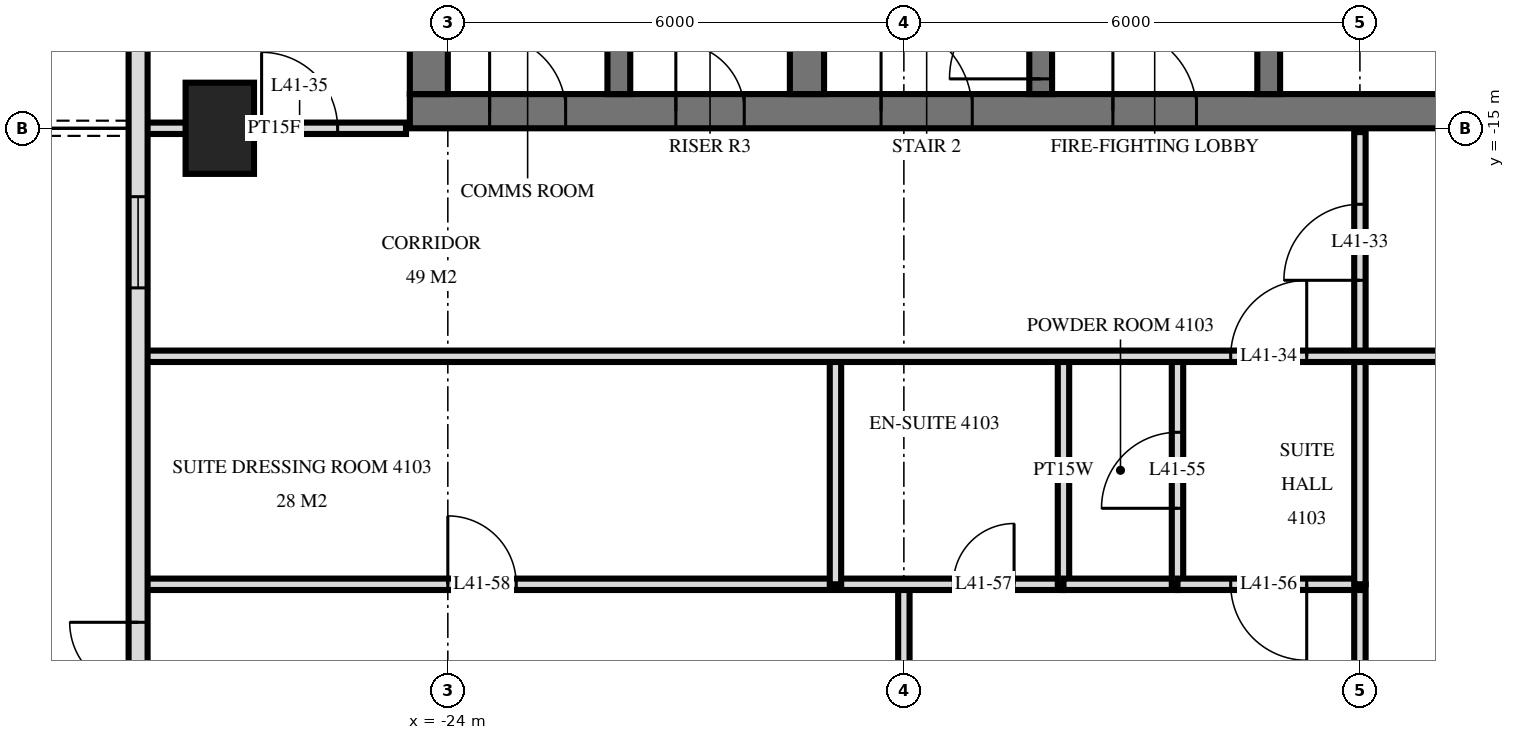
"""IFC4 building model, lengths in metres.
Left out: names, types, materials, properties, quantities, classifications, styles, units other than length and angle.
Written with IfcOpenShell. Run it as: python <this file> out.ifc"""

import sys

from ifc_helpers import new_model, si_unit, direction, frame, frame_2d, origin, origin_2d, place, context, subcontext, project, spatial, rectangle, extrude, element, fill, save


model = new_model("IFC4")
c1 = context("Model", 3, precision=1e-05, world=origin(), true_north=direction((0.0, 1.0)))
c2 = subcontext(c1, "Body", "Model", "MODEL_VIEW")
j1 = project(units=[si_unit("LENGTHUNIT", "METRE"), si_unit("PLANEANGLEUNIT", "RADIAN")], contexts=[c1])
p1 = place(None, origin())
s1 = spatial("IfcSite", under=j1, at=p1, CompositionType="ELEMENT")
p2 = place(p1, origin())
s2 = spatial("IfcBuilding", under=s1, at=p2, CompositionType="ELEMENT")
p3 = place(p2, frame((0.0, 0.0, 159.6)))
s3 = spatial("IfcBuildingStorey", under=s2, at=p3, CompositionType="ELEMENT", Elevation=159.6)
p4 = place(p3, frame((-27.0, -15.0, 0.0), z_axis=(0.0, 0.0, 1.0), x_axis=(0.0, 1.0, 0.0)))
e1 = element("IfcColumn", 1, at=p4, inside=s3, PredefinedType="COLUMN", context=c2, shape_type="SweptSolid", body=[
    extrude(rectangle(XDim=1.2, YDim=0.9, at=origin_2d()), origin(), (0.0, 0.0, 1.0), 3.6),
])
p5 = place(p3, frame((-24.5, -14.775, 0.0), z_axis=(0.0, 0.0, 1.0), x_axis=(1.0, 0.0, 0.0)))
e2 = element("IfcWall", 2, at=p5, inside=s3, PredefinedType="SHEAR", context=c2, shape_type="SweptSolid", body=[
    extrude(rectangle(XDim=14.5, YDim=0.45, at=frame_2d((7.25, 0.0))), origin(), (0.0, 0.0, 1.0), 3.6),
])
p6 = place(p5, frame((6.2, 0.0, 0.0)))
e3 = element("IfcOpeningElement", 3, at=p6, cuts=e2, PredefinedType="OPENING", context=c2, shape_type="SweptSolid", body=[
    extrude(rectangle(XDim=1.2, YDim=2.1, at=frame_2d((0.6, 1.05))), frame((0.0, 0.235, 0.0), z_axis=(0.0, -1.0, 0.0), x_axis=(1.0, 0.0, 0.0)), (0.0, 0.0, 1.0), 0.47),
])
p7 = place(p5, frame((9.25, 0.0, 0.0)))
e4 = element("IfcOpeningElement", 4, at=p7, cuts=e2, PredefinedType="OPENING", context=c2, shape_type="SweptSolid", body=[
    extrude(rectangle(XDim=1.1, YDim=2.1, at=frame_2d((0.55, 1.05))), frame((0.0, 0.235, 0.0), z_axis=(0.0, -1.0, 0.0), x_axis=(1.0, 0.0, 0.0)), (0.0, 0.0, 1.0), 0.47),
])
p8 = place(p5, frame((3.5, 0.0, 0.0)))
e5 = element("IfcOpeningElement", 5, at=p8, cuts=e2, PredefinedType="OPENING", context=c2, shape_type="SweptSolid", body=[
    extrude(rectangle(XDim=0.9, YDim=2.1, at=frame_2d((0.45, 1.05))), frame((0.0, 0.235, 0.0), z_axis=(0.0, -1.0, 0.0), x_axis=(1.0, 0.0, 0.0)), (0.0, 0.0, 1.0), 0.47),
])
p9 = place(p5, frame((1.05, 0.0, 0.0)))
e6 = element("IfcOpeningElement", 6, at=p9, cuts=e2, PredefinedType="OPENING", context=c2, shape_type="SweptSolid", body=[
    extrude(rectangle(XDim=1.0, YDim=2.1, at=frame_2d((0.5, 1.05))), frame((0.0, 0.235, 0.0), z_axis=(0.0, -1.0, 0.0), x_axis=(1.0, 0.0, 0.0)), (0.0, 0.0, 1.0), 0.47),
])
p10 = place(p3, frame((-24.25, -14.55, 0.0), z_axis=(0.0, 0.0, 1.0), x_axis=(0.0, 1.0, 0.0)))
e7 = element("IfcWall", 7, at=p10, inside=s3, PredefinedType="SHEAR", context=c2, shape_type="SweptSolid", body=[
    extrude(rectangle(XDim=14.1, YDim=0.5, at=frame_2d((7.05, 0.0))), origin(), (0.0, 0.0, 1.0), 3.6),
])
p11 = place(p3, frame((-13.2, -14.55, 0.0), z_axis=(0.0, 0.0, 1.0), x_axis=(0.0, 1.0, 0.0)))
e8 = element("IfcWall", 8, at=p11, inside=s3, PredefinedType="SHEAR", context=c2, shape_type="SweptSolid", body=[
    extrude(rectangle(XDim=5.4, YDim=0.3, at=frame_2d((2.7, 0.0))), origin(), (0.0, 0.0, 1.0), 3.6),
])
p12 = place(p11, frame((4.0, 0.0, 0.0)))
e9 = element("IfcOpeningElement", 9, at=p12, cuts=e8, PredefinedType="OPENING", context=c2, shape_type="SweptSolid", body=[
    extrude(rectangle(XDim=1.2, YDim=2.1, at=frame_2d((0.6, 1.05))), frame((0.0, 0.16, 0.0), z_axis=(0.0, -1.0, 0.0), x_axis=(1.0, 0.0, 0.0)), (0.0, 0.0, 1.0), 0.32),
])
p13 = place(p3, frame((-16.2, -14.55, 0.0), z_axis=(0.0, 0.0, 1.0), x_axis=(0.0, 1.0, 0.0)))
e10 = element("IfcWall", 10, at=p13, inside=s3, PredefinedType="SHEAR", context=c2, shape_type="SweptSolid", body=[
    extrude(rectangle(XDim=5.4, YDim=0.3, at=frame_2d((2.7, 0.0))), origin(), (0.0, 0.0, 1.0), 3.6),
])
p14 = place(p13, frame((0.2, 0.0, 0.0)))
e11 = element("IfcOpeningElement", 11, at=p14, cuts=e10, PredefinedType="OPENING", context=c2, shape_type="SweptSolid", body=[
    extrude(rectangle(XDim=1.2, YDim=2.1, at=frame_2d((0.6, 1.05))), frame((0.0, 0.16, 0.0), z_axis=(0.0, -1.0, 0.0), x_axis=(1.0, 0.0, 0.0)), (0.0, 0.0, 1.0), 0.32),
])
p15 = place(p3, frame((-19.275, -14.55, 0.0), z_axis=(0.0, 0.0, 1.0), x_axis=(0.0, 1.0, 0.0)))
e12 = element("IfcWall", 12, at=p15, inside=s3, PredefinedType="SHEAR", context=c2, shape_type="SweptSolid", body=[
    extrude(rectangle(XDim=5.4, YDim=0.45, at=frame_2d((2.7, 0.0))), origin(), (0.0, 0.0, 1.0), 3.6),
])
p16 = place(p3, frame((-21.75, -14.55, 0.0), z_axis=(0.0, 0.0, 1.0), x_axis=(0.0, 1.0, 0.0)))
e13 = element("IfcWall", 13, at=p16, inside=s3, PredefinedType="SHEAR", context=c2, shape_type="SweptSolid", body=[
    extrude(rectangle(XDim=5.4, YDim=0.3, at=frame_2d((2.7, 0.0))), origin(), (0.0, 0.0, 1.0), 3.6),
])
p17 = place(p3, frame((-28.075, -3.325, 0.0), z_axis=(0.0, 0.0, 1.0), x_axis=(0.0, -1.0, 0.0)))
e14 = element("IfcWall", 14, at=p17, inside=s3, PredefinedType="SOLIDWALL", context=c2, shape_type="SweptSolid", body=[
    extrude(rectangle(XDim=25.951, YDim=0.25, at=frame_2d((12.975, 0.0))), origin(), (0.0, 0.0, 1.0), 3.32),
])
p18 = place(p17, frame((6.65, 0.0, 0.0)))
e15 = element("IfcOpeningElement", 15, at=p18, cuts=e14, PredefinedType="OPENING", context=c2, shape_type="SweptSolid", body=[
    extrude(rectangle(XDim=1.8, YDim=2.4, at=frame_2d((0.9, 1.2))), frame((0.0, 0.135, 0.0), z_axis=(0.0, -1.0, 0.0), x_axis=(1.0, 0.0, 0.0)), (0.0, 0.0, 1.0), 0.27),
])
p19 = place(p17, frame((12.575, 0.0, 0.3)))
e16 = element("IfcOpeningElement", 16, at=p19, cuts=e14, PredefinedType="OPENING", context=c2, shape_type="SweptSolid", body=[
    extrude(rectangle(XDim=1.2, YDim=2.1, at=frame_2d((0.6, 1.05))), frame((0.0, 0.135, 0.0), z_axis=(0.0, -1.0, 0.0), x_axis=(1.0, 0.0, 0.0)), (0.0, 0.0, 1.0), 0.27),
])
p20 = place(p17, frame((18.175, 0.0, 0.0)))
e17 = element("IfcOpeningElement", 17, at=p20, cuts=e14, PredefinedType="OPENING", context=c2, shape_type="SweptSolid", body=[
    extrude(rectangle(XDim=1.8, YDim=2.4, at=frame_2d((0.9, 1.2))), frame((0.0, 0.135, 0.0), z_axis=(0.0, -1.0, 0.0), x_axis=(1.0, 0.0, 0.0)), (0.0, 0.0, 1.0), 0.27),
])
p21 = place(p17, frame((21.075, 0.0, 0.0)))
e18 = element("IfcOpeningElement", 18, at=p21, cuts=e14, PredefinedType="OPENING", context=c2, shape_type="SweptSolid", body=[
    extrude(rectangle(XDim=1.8, YDim=2.4, at=frame_2d((0.9, 1.2))), frame((0.0, 0.135, 0.0), z_axis=(0.0, -1.0, 0.0), x_axis=(1.0, 0.0, 0.0)), (0.0, 0.0, 1.0), 0.27),
])
p22 = place(p17, frame((23.825, 0.0, 0.3)))
e19 = element("IfcOpeningElement", 19, at=p22, cuts=e14, PredefinedType="OPENING", context=c2, shape_type="SweptSolid", body=[
    extrude(rectangle(XDim=1.8, YDim=2.1, at=frame_2d((0.9, 1.05))), frame((0.0, 0.135, 0.0), z_axis=(0.0, -1.0, 0.0), x_axis=(1.0, 0.0, 0.0)), (0.0, 0.0, 1.0), 0.27),
])
p23 = place(p3, frame((-12.0, -21.0, 0.0), z_axis=(0.0, 0.0, 1.0), x_axis=(0.0, 1.0, 0.0)))
e20 = element("IfcWall", 20, at=p23, inside=s3, PredefinedType="PARTITIONING", context=c2, shape_type="SweptSolid", body=[
    extrude(rectangle(XDim=5.95, YDim=0.15, at=frame_2d((2.975, 0.0))), origin(), (0.0, 0.0, 1.0), 3.32),
])
p24 = place(p23, frame((4.0, 0.0, 0.0)))
e21 = element("IfcOpeningElement", 21, at=p24, cuts=e20, PredefinedType="OPENING", context=c2, shape_type="SweptSolid", body=[
    extrude(rectangle(XDim=1.0, YDim=2.1, at=frame_2d((0.5, 1.05))), frame((0.0, 0.085, 0.0), z_axis=(0.0, -1.0, 0.0), x_axis=(1.0, 0.0, 0.0)), (0.0, 0.0, 1.0), 0.17),
])
p25 = place(p3, frame((-12.0, -33.62, 0.0), z_axis=(0.0, 0.0, 1.0), x_axis=(0.0, 1.0, 0.0)))
e22 = element("IfcWall", 22, at=p25, inside=s3, PredefinedType="PARTITIONING", context=c2, shape_type="SweptSolid", body=[
    extrude(rectangle(XDim=12.62, YDim=0.15, at=frame_2d((6.31, 0.0))), origin(), (0.0, 0.0, 1.0), 3.32),
])
p26 = place(p3, frame((-14.4, -21.0, 0.0), z_axis=(0.0, 0.0, 1.0), x_axis=(0.0, 1.0, 0.0)))
e23 = element("IfcWall", 23, at=p26, inside=s3, PredefinedType="PARTITIONING", context=c2, shape_type="SweptSolid", body=[
    extrude(rectangle(XDim=3.0, YDim=0.15, at=frame_2d((1.5, 0.0))), origin(), (0.0, 0.0, 1.0), 3.32),
])
p27 = place(p26, frame((1.0, 0.0, 0.0)))
e24 = element("IfcOpeningElement", 24, at=p27, cuts=e23, PredefinedType="OPENING", context=c2, shape_type="SweptSolid", body=[
    extrude(rectangle(XDim=1.0, YDim=2.1, at=frame_2d((0.5, 1.05))), frame((0.0, 0.085, 0.0), z_axis=(0.0, -1.0, 0.0), x_axis=(1.0, 0.0, 0.0)), (0.0, 0.0, 1.0), 0.17),
])
p28 = place(p3, frame((-15.9, -21.0, 0.0), z_axis=(0.0, 0.0, 1.0), x_axis=(0.0, 1.0, 0.0)))
e25 = element("IfcWall", 25, at=p28, inside=s3, PredefinedType="PLUMBINGWALL", context=c2, shape_type="SweptSolid", body=[
    extrude(rectangle(XDim=3.0, YDim=0.15, at=frame_2d((1.5, 0.0))), origin(), (0.0, 0.0, 1.0), 3.32),
])
p29 = place(p3, frame((-18.0, -33.62, 0.0), z_axis=(0.0, 0.0, 1.0), x_axis=(0.0, 1.0, 0.0)))
e26 = element("IfcWall", 26, at=p29, inside=s3, PredefinedType="PARTITIONING", context=c2, shape_type="SweptSolid", body=[
    extrude(rectangle(XDim=12.62, YDim=0.15, at=frame_2d((6.31, 0.0))), origin(), (0.0, 0.0, 1.0), 3.32),
])
p30 = place(p29, frame((5.79, 0.0, 0.0)))
e27 = element("IfcOpeningElement", 27, at=p30, cuts=e26, PredefinedType="OPENING", context=c2, shape_type="SweptSolid", body=[
    extrude(rectangle(XDim=0.9, YDim=2.1, at=frame_2d((0.45, 1.05))), frame((0.0, 0.085, 0.0), z_axis=(0.0, -1.0, 0.0), x_axis=(1.0, 0.0, 0.0)), (0.0, 0.0, 1.0), 0.17),
])
p31 = place(p3, frame((-18.9, -21.0, 0.0), z_axis=(0.0, 0.0, 1.0), x_axis=(0.0, 1.0, 0.0)))
e28 = element("IfcWall", 28, at=p31, inside=s3, PredefinedType="PARTITIONING", context=c2, shape_type="SweptSolid", body=[
    extrude(rectangle(XDim=3.0, YDim=0.15, at=frame_2d((1.5, 0.0))), origin(), (0.0, 0.0, 1.0), 3.32),
])
p32 = place(p3, frame((-14.4, -21.0, 0.0), z_axis=(0.0, 0.0, 1.0), x_axis=(1.0, 0.0, 0.0)))
e29 = element("IfcWall", 29, at=p32, inside=s3, PredefinedType="PARTITIONING", context=c2, shape_type="SweptSolid", body=[
    extrude(rectangle(XDim=2.4, YDim=0.15, at=frame_2d((1.2, 0.0))), origin(), (0.0, 0.0, 1.0), 3.32),
])
p33 = place(p32, frame((0.7, 0.0, 0.0)))
e30 = element("IfcOpeningElement", 30, at=p33, cuts=e29, PredefinedType="OPENING", context=c2, shape_type="SweptSolid", body=[
    extrude(rectangle(XDim=1.0, YDim=2.1, at=frame_2d((0.5, 1.05))), frame((0.0, 0.085, 0.0), z_axis=(0.0, -1.0, 0.0), x_axis=(1.0, 0.0, 0.0)), (0.0, 0.0, 1.0), 0.17),
])
p34 = place(p3, frame((-28.02, -21.0, 0.0), z_axis=(0.0, 0.0, 1.0), x_axis=(1.0, 0.0, 0.0)))
e31 = element("IfcWall", 31, at=p34, inside=s3, PredefinedType="PARTITIONING", context=c2, shape_type="SweptSolid", body=[
    extrude(rectangle(XDim=12.12, YDim=0.15, at=frame_2d((6.06, 0.0))), origin(), (0.0, 0.0, 1.0), 3.32),
])
p35 = place(p34, frame((10.67, 0.0, 0.0)))
e32 = element("IfcOpeningElement", 32, at=p35, cuts=e31, PredefinedType="OPENING", context=c2, shape_type="SweptSolid", body=[
    extrude(rectangle(XDim=0.8, YDim=2.1, at=frame_2d((0.4, 1.05))), frame((0.0, 0.085, 0.0), z_axis=(0.0, -1.0, 0.0), x_axis=(1.0, 0.0, 0.0)), (0.0, 0.0, 1.0), 0.17),
])
p36 = place(p34, frame((4.02, 0.0, 0.0)))
e33 = element("IfcOpeningElement", 33, at=p36, cuts=e31, PredefinedType="OPENING", context=c2, shape_type="SweptSolid", body=[
    extrude(rectangle(XDim=0.9, YDim=2.1, at=frame_2d((0.45, 1.05))), frame((0.0, 0.085, 0.0), z_axis=(0.0, -1.0, 0.0), x_axis=(1.0, 0.0, 0.0)), (0.0, 0.0, 1.0), 0.17),
])
p37 = place(p3, frame((-15.9, -21.0, 0.0), z_axis=(0.0, 0.0, 1.0), x_axis=(1.0, 0.0, 0.0)))
e34 = element("IfcWall", 34, at=p37, inside=s3, PredefinedType="PLUMBINGWALL", context=c2, shape_type="SweptSolid", body=[
    extrude(rectangle(XDim=1.5, YDim=0.15, at=frame_2d((0.75, 0.0))), origin(), (0.0, 0.0, 1.0), 3.32),
])
p38 = place(p3, frame((-28.02, -18.0, 0.0), z_axis=(0.0, 0.0, 1.0), x_axis=(1.0, 0.0, 0.0)))
e35 = element("IfcWall", 35, at=p38, inside=s3, PredefinedType="PARTITIONING", context=c2, shape_type="SweptSolid", body=[
    extrude(rectangle(XDim=56.04, YDim=0.15, at=frame_2d((28.02, 0.0))), origin(), (0.0, 0.0, 1.0), 3.32),
])
p39 = place(p38, frame((14.32, 0.0, 0.0)))
e36 = element("IfcOpeningElement", 36, at=p39, cuts=e35, PredefinedType="OPENING", context=c2, shape_type="SweptSolid", body=[
    extrude(rectangle(XDim=1.0, YDim=2.1, at=frame_2d((0.5, 1.05))), frame((0.0, 0.085, 0.0), z_axis=(0.0, -1.0, 0.0), x_axis=(1.0, 0.0, 0.0)), (0.0, 0.0, 1.0), 0.17),
])
p40 = place(p38, frame((40.17, 0.0, 0.0)))
e37 = element("IfcOpeningElement", 37, at=p40, cuts=e35, PredefinedType="OPENING", context=c2, shape_type="SweptSolid", body=[
    extrude(rectangle(XDim=1.0, YDim=2.1, at=frame_2d((0.5, 1.05))), frame((0.0, 0.085, 0.0), z_axis=(0.0, -1.0, 0.0), x_axis=(1.0, 0.0, 0.0)), (0.0, 0.0, 1.0), 0.17),
])
p41 = place(p38, frame((44.87, 0.0, 0.0)))
e38 = element("IfcOpeningElement", 38, at=p41, cuts=e35, PredefinedType="OPENING", context=c2, shape_type="SweptSolid", body=[
    extrude(rectangle(XDim=1.0, YDim=2.1, at=frame_2d((0.5, 1.05))), frame((0.0, 0.085, 0.0), z_axis=(0.0, -1.0, 0.0), x_axis=(1.0, 0.0, 0.0)), (0.0, 0.0, 1.0), 0.17),
])
p42 = place(p38, frame((46.72, 0.0, 0.0)))
e39 = element("IfcOpeningElement", 39, at=p42, cuts=e35, PredefinedType="OPENING", context=c2, shape_type="SweptSolid", body=[
    extrude(rectangle(XDim=1.0, YDim=2.1, at=frame_2d((0.5, 1.05))), frame((0.0, 0.085, 0.0), z_axis=(0.0, -1.0, 0.0), x_axis=(1.0, 0.0, 0.0)), (0.0, 0.0, 1.0), 0.17),
])
p43 = place(p38, frame((18.52, 0.0, 0.0)))
e40 = element("IfcOpeningElement", 40, at=p43, cuts=e35, PredefinedType="OPENING", context=c2, shape_type="SweptSolid", body=[
    extrude(rectangle(XDim=1.0, YDim=2.1, at=frame_2d((0.5, 1.05))), frame((0.0, 0.085, 0.0), z_axis=(0.0, -1.0, 0.0), x_axis=(1.0, 0.0, 0.0)), (0.0, 0.0, 1.0), 0.17),
])
p44 = place(p38, frame((24.52, 0.0, 0.0)))
e41 = element("IfcOpeningElement", 41, at=p44, cuts=e35, PredefinedType="OPENING", context=c2, shape_type="SweptSolid", body=[
    extrude(rectangle(XDim=1.0, YDim=2.1, at=frame_2d((0.5, 1.05))), frame((0.0, 0.085, 0.0), z_axis=(0.0, -1.0, 0.0), x_axis=(1.0, 0.0, 0.0)), (0.0, 0.0, 1.0), 0.17),
])
p45 = place(p38, frame((30.52, 0.0, 0.0)))
e42 = element("IfcOpeningElement", 42, at=p45, cuts=e35, PredefinedType="OPENING", context=c2, shape_type="SweptSolid", body=[
    extrude(rectangle(XDim=1.0, YDim=2.1, at=frame_2d((0.5, 1.05))), frame((0.0, 0.085, 0.0), z_axis=(0.0, -1.0, 0.0), x_axis=(1.0, 0.0, 0.0)), (0.0, 0.0, 1.0), 0.17),
])
p46 = place(p38, frame((36.52, 0.0, 0.0)))
e43 = element("IfcOpeningElement", 43, at=p46, cuts=e35, PredefinedType="OPENING", context=c2, shape_type="SweptSolid", body=[
    extrude(rectangle(XDim=1.0, YDim=2.1, at=frame_2d((0.5, 1.05))), frame((0.0, 0.085, 0.0), z_axis=(0.0, -1.0, 0.0), x_axis=(1.0, 0.0, 0.0)), (0.0, 0.0, 1.0), 0.17),
])
p47 = place(p3, frame((-28.02, -15.0, 0.0), z_axis=(0.0, 0.0, 1.0), x_axis=(1.0, 0.0, 0.0)))
e44 = element("IfcWall", 44, at=p47, inside=s3, PredefinedType="PARTITIONING", context=c2, shape_type="SweptSolid", body=[
    extrude(rectangle(XDim=3.47, YDim=0.15, at=frame_2d((1.735, 0.0))), origin(), (0.0, 0.0, 1.0), 3.32),
])
p48 = place(p47, frame((1.57, 0.0, 0.0)))
e45 = element("IfcOpeningElement", 45, at=p48, cuts=e44, PredefinedType="OPENING", context=c2, shape_type="SweptSolid", body=[
    extrude(rectangle(XDim=1.0, YDim=2.1, at=frame_2d((0.5, 1.05))), frame((0.0, 0.085, 0.0), z_axis=(0.0, -1.0, 0.0), x_axis=(1.0, 0.0, 0.0)), (0.0, 0.0, 1.0), 0.17),
])
p49 = place(p19, origin())
e46 = element("IfcWindow", 46, at=p49, inside=s3, PartitioningType="SINGLE_PANEL", PredefinedType="WINDOW", context=c2, shape_type="SweptSolid", body=[
    extrude(rectangle(XDim=1.2, YDim=2.1, at=frame_2d((0.6, 1.05))), frame((0.0, 0.03, 0.0), z_axis=(0.0, -1.0, 0.0), x_axis=(1.0, 0.0, 0.0)), (0.0, 0.0, 1.0), 0.06),
])
fill(e16, e46)
p50 = place(p20, frame((0.9, 0.0, 0.0), z_axis=(0.0, 0.0, 1.0), x_axis=(-1.0, 0.0, 0.0)))
e47 = element("IfcDoor", 47, at=p50, inside=s3, OperationType="DOUBLE_DOOR_SINGLE_SWING", PredefinedType="DOOR", context=c2, shape_type="SweptSolid", body=[
    extrude(rectangle(XDim=1.8, YDim=2.4, at=frame_2d((0.0, 1.2))), frame((0.0, -0.025, 0.0), z_axis=(0.0, 1.0, 0.0), x_axis=(-1.0, 0.0, 0.0)), (0.0, 0.0, 1.0), 0.05),
])
fill(e17, e47)
p51 = place(p6, origin())
e48 = element("IfcDoor", 48, at=p51, inside=s3, OperationType="SINGLE_SWING_RIGHT", PredefinedType="DOOR", context=c2, shape_type="SweptSolid", body=[
    extrude(rectangle(XDim=1.2, YDim=2.1, at=frame_2d((0.6, 1.05))), frame((0.0, 0.025, 0.0), z_axis=(0.0, -1.0, 0.0), x_axis=(1.0, 0.0, 0.0)), (0.0, 0.0, 1.0), 0.05),
])
fill(e3, e48)
p52 = place(p7, origin())
e49 = element("IfcDoor", 49, at=p52, inside=s3, OperationType="SINGLE_SWING_RIGHT", PredefinedType="DOOR", context=c2, shape_type="SweptSolid", body=[
    extrude(rectangle(XDim=1.1, YDim=2.1, at=frame_2d((0.55, 1.05))), frame((0.0, 0.025, 0.0), z_axis=(0.0, -1.0, 0.0), x_axis=(1.0, 0.0, 0.0)), (0.0, 0.0, 1.0), 0.05),
])
fill(e4, e49)
p53 = place(p8, origin())
e50 = element("IfcDoor", 50, at=p53, inside=s3, OperationType="SINGLE_SWING_RIGHT", PredefinedType="DOOR", context=c2, shape_type="SweptSolid", body=[
    extrude(rectangle(XDim=0.9, YDim=2.1, at=frame_2d((0.45, 1.05))), frame((0.0, 0.025, 0.0), z_axis=(0.0, -1.0, 0.0), x_axis=(1.0, 0.0, 0.0)), (0.0, 0.0, 1.0), 0.05),
])
fill(e5, e50)
p54 = place(p9, origin())
e51 = element("IfcDoor", 51, at=p54, inside=s3, OperationType="SINGLE_SWING_RIGHT", PredefinedType="DOOR", context=c2, shape_type="SweptSolid", body=[
    extrude(rectangle(XDim=1.0, YDim=2.1, at=frame_2d((0.5, 1.05))), frame((0.0, 0.025, 0.0), z_axis=(0.0, -1.0, 0.0), x_axis=(1.0, 0.0, 0.0)), (0.0, 0.0, 1.0), 0.05),
])
fill(e6, e51)
p55 = place(p14, origin())
e52 = element("IfcDoor", 52, at=p55, inside=s3, OperationType="SINGLE_SWING_RIGHT", PredefinedType="DOOR", context=c2, shape_type="SweptSolid", body=[
    extrude(rectangle(XDim=1.2, YDim=2.1, at=frame_2d((0.6, 1.05))), frame((0.0, 0.025, 0.0), z_axis=(0.0, -1.0, 0.0), x_axis=(1.0, 0.0, 0.0)), (0.0, 0.0, 1.0), 0.05),
])
fill(e11, e52)
p56 = place(p24, origin())
e53 = element("IfcDoor", 53, at=p56, inside=s3, OperationType="SINGLE_SWING_RIGHT", PredefinedType="DOOR", context=c2, shape_type="SweptSolid", body=[
    extrude(rectangle(XDim=1.0, YDim=2.1, at=frame_2d((0.5, 1.05))), frame((0.0, 0.025, 0.0), z_axis=(0.0, -1.0, 0.0), x_axis=(1.0, 0.0, 0.0)), (0.0, 0.0, 1.0), 0.05),
])
fill(e21, e53)
p57 = place(p39, origin())
e54 = element("IfcDoor", 54, at=p57, inside=s3, OperationType="SINGLE_SWING_LEFT", PredefinedType="DOOR", context=c2, shape_type="SweptSolid", body=[
    extrude(rectangle(XDim=1.0, YDim=2.1, at=frame_2d((0.5, 1.05))), frame((0.0, 0.025, 0.0), z_axis=(0.0, -1.0, 0.0), x_axis=(1.0, 0.0, 0.0)), (0.0, 0.0, 1.0), 0.05),
])
fill(e36, e54)
p58 = place(p48, origin())
e55 = element("IfcDoor", 55, at=p58, inside=s3, OperationType="SINGLE_SWING_RIGHT", PredefinedType="DOOR", context=c2, shape_type="SweptSolid", body=[
    extrude(rectangle(XDim=1.0, YDim=2.1, at=frame_2d((0.5, 1.05))), frame((0.0, 0.025, 0.0), z_axis=(0.0, -1.0, 0.0), x_axis=(1.0, 0.0, 0.0)), (0.0, 0.0, 1.0), 0.05),
])
fill(e45, e55)
p59 = place(p27, origin())
e56 = element("IfcDoor", 56, at=p59, inside=s3, OperationType="SINGLE_SWING_RIGHT", PredefinedType="DOOR", context=c2, shape_type="SweptSolid", body=[
    extrude(rectangle(XDim=1.0, YDim=2.1, at=frame_2d((0.5, 1.05))), frame((0.0, 0.025, 0.0), z_axis=(0.0, -1.0, 0.0), x_axis=(1.0, 0.0, 0.0)), (0.0, 0.0, 1.0), 0.05),
])
fill(e24, e56)
p60 = place(p33, frame((0.5, 0.0, 0.0), z_axis=(0.0, 0.0, 1.0), x_axis=(-1.0, 0.0, 0.0)))
e57 = element("IfcDoor", 57, at=p60, inside=s3, OperationType="SINGLE_SWING_RIGHT", PredefinedType="DOOR", context=c2, shape_type="SweptSolid", body=[
    extrude(rectangle(XDim=1.0, YDim=2.1, at=frame_2d((0.0, 1.05))), frame((0.0, -0.025, 0.0), z_axis=(0.0, 1.0, 0.0), x_axis=(-1.0, 0.0, 0.0)), (0.0, 0.0, 1.0), 0.05),
])
fill(e30, e57)
p61 = place(p35, origin())
e58 = element("IfcDoor", 58, at=p61, inside=s3, OperationType="SINGLE_SWING_LEFT", PredefinedType="DOOR", context=c2, shape_type="SweptSolid", body=[
    extrude(rectangle(XDim=0.8, YDim=2.1, at=frame_2d((0.4, 1.05))), frame((0.0, 0.025, 0.0), z_axis=(0.0, -1.0, 0.0), x_axis=(1.0, 0.0, 0.0)), (0.0, 0.0, 1.0), 0.05),
])
fill(e32, e58)
p62 = place(p36, origin())
e59 = element("IfcDoor", 59, at=p62, inside=s3, OperationType="SINGLE_SWING_RIGHT", PredefinedType="DOOR", context=c2, shape_type="SweptSolid", body=[
    extrude(rectangle(XDim=0.9, YDim=2.1, at=frame_2d((0.45, 1.05))), frame((0.0, 0.025, 0.0), z_axis=(0.0, -1.0, 0.0), x_axis=(1.0, 0.0, 0.0)), (0.0, 0.0, 1.0), 0.05),
])
fill(e33, e59)
save(model, sys.argv[1])
